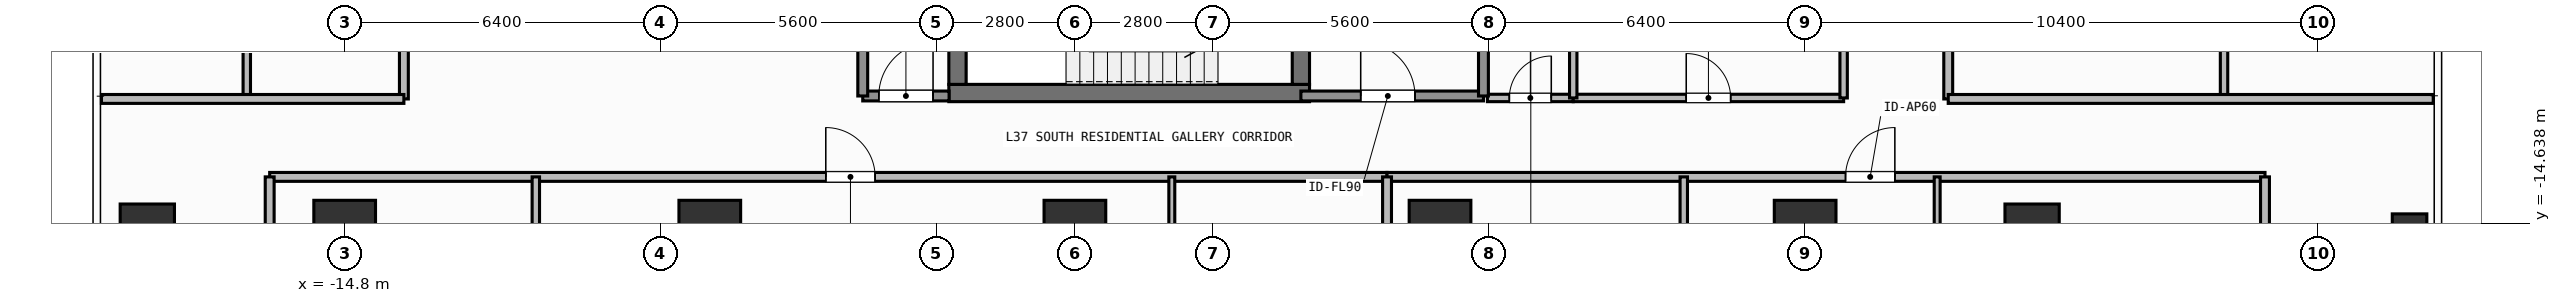
"""IFC4 building model, lengths in metres.
Left out: names, types, materials, properties, quantities, classifications, styles, units other than length and angle.
Written with IfcOpenShell. Run it as: python <this file> out.ifc"""

import sys

from ifc_helpers import new_model, si_unit, direction, frame, frame_2d, origin, origin_2d, place, context, subcontext, project, spatial, rectangle, hollow_rectangle, extrude, element, fill, save


model = new_model("IFC4")
c1 = context("Model", 3, precision=1e-05, world=origin(), true_north=direction((0.0, 1.0)))
c2 = subcontext(c1, "Body", "Model", "MODEL_VIEW")
j1 = project(units=[si_unit("LENGTHUNIT", "METRE"), si_unit("PLANEANGLEUNIT", "RADIAN")], contexts=[c1])
p1 = place(None, origin())
s1 = spatial("IfcSite", under=j1, at=p1, CompositionType="ELEMENT")
p2 = place(p1, origin())
s2 = spatial("IfcBuilding", under=s1, at=p2, CompositionType="ELEMENT")
p3 = place(p2, frame((0.0, 0.0, 148.5)))
s3 = spatial("IfcBuildingStorey", under=s2, at=p3, CompositionType="ELEMENT", Elevation=148.5)
p4 = place(p3, frame((-2.555, -12.0, 0.0), z_axis=(0.0, 0.0, 1.0), x_axis=(1.0, 0.0, 0.0)))
e1 = element("IfcWall", 1, at=p4, inside=s3, PredefinedType="SHEAR", context=c2, shape_type="SweptSolid", body=[
    extrude(rectangle(XDim=7.31, YDim=0.35, at=frame_2d((3.655, 0.0))), origin(), (0.0, 0.0, 1.0), 3.9),
])
p5 = place(p3, frame((-2.38, -11.825, 0.0), z_axis=(0.0, 0.0, 1.0), x_axis=(0.0, 1.0, 0.0)))
e2 = element("IfcWall", 2, at=p5, inside=s3, PredefinedType="SHEAR", context=c2, shape_type="SweptSolid", body=[
    extrude(rectangle(XDim=2.925, YDim=0.35, at=frame_2d((1.462, 0.0))), origin(), (0.0, 0.0, 1.0), 3.9),
])
p6 = place(p3, frame((4.58, -8.9, 0.0), z_axis=(0.0, 0.0, 1.0), x_axis=(0.0, -1.0, 0.0)))
e3 = element("IfcWall", 3, at=p6, inside=s3, PredefinedType="SHEAR", context=c2, shape_type="SweptSolid", body=[
    extrude(rectangle(XDim=2.925, YDim=0.35, at=frame_2d((1.462, 0.0))), origin(), (0.0, 0.0, 1.0), 3.9),
])
p7 = place(p6, frame((0.913, 0.0, 0.0)))
e4 = element("IfcOpeningElement", 4, at=p7, cuts=e3, PredefinedType="OPENING", context=c2, shape_type="SweptSolid", body=[
    extrude(rectangle(XDim=1.1, YDim=2.15, at=frame_2d((0.55, 1.075))), frame((0.0, 0.185, 0.0), z_axis=(0.0, -1.0, 0.0), x_axis=(1.0, 0.0, 0.0)), (0.0, 0.0, 1.0), 0.37),
])
for number, where, z_axis, x_axis in (
    (5, (-14.8, -14.8, 0.0), (0.0, 0.0, 1.0), (1.0, 0.0, 0.0)),
    (6, (-7.4, -14.8, 0.0), (0.0, 0.0, 1.0), (1.0, 0.0, 0.0)),
    (7, (0.0, -14.8, 0.0), (0.0, 0.0, 1.0), (1.0, 0.0, 0.0)),
    (8, (7.4, -14.8, 0.0), (0.0, 0.0, 1.0), (1.0, 0.0, 0.0)),
    (9, (14.8, -14.8, 0.0), (0.0, 0.0, 1.0), (1.0, 0.0, 0.0)),
):
    element("IfcColumn", number, at=place(p3, frame(where, z_axis=z_axis, x_axis=x_axis)), inside=s3, PredefinedType="COLUMN", context=c2, shape_type="SweptSolid", body=[
        extrude(rectangle(XDim=1.25, YDim=1.25, at=origin_2d()), origin(), (0.0, 0.0, 1.0), 3.9),
    ])
for number, where, z_axis, x_axis in (
    (10, (-18.8, -14.8, 0.0), (0.0, 0.0, 1.0), (1.0, 0.0, 0.0)),
    (11, (19.4, -14.8, 0.0), (0.0, 0.0, 1.0), (1.0, 0.0, 0.0)),
):
    element("IfcColumn", number, at=place(p3, frame(where, z_axis=z_axis, x_axis=x_axis)), inside=s3, PredefinedType="COLUMN", context=c2, shape_type="SweptSolid", body=[
        extrude(rectangle(XDim=1.1, YDim=1.1, at=origin_2d()), origin(), (0.0, 0.0, 1.0), 3.9),
    ])
p8 = place(p3, frame((27.05, -14.8, 0.0), z_axis=(0.0, 0.0, 1.0), x_axis=(1.0, 0.0, 0.0)))
e12 = element("IfcColumn", 12, at=p8, inside=s3, PredefinedType="COLUMN", context=c2, shape_type="SweptSolid", body=[
    extrude(hollow_rectangle(XDim=0.7, YDim=0.7, WallThickness=0.032, at=origin_2d()), origin(), (0.0, 0.0, 1.0), 3.9),
])
p9 = place(p3, frame((4.58, -12.06, 0.0), z_axis=(0.0, 0.0, 1.0), x_axis=(1.0, 0.0, 0.0)))
e13 = element("IfcWall", 13, at=p9, inside=s3, PredefinedType="SOLIDWALL", context=c2, shape_type="SweptSolid", body=[
    extrude(rectangle(XDim=3.7, YDim=0.2, at=frame_2d((1.85, 0.0))), origin(), (0.0, 0.0, 1.0), 3.68),
])
p10 = place(p9, frame((1.212, 0.0, 0.0)))
e14 = element("IfcOpeningElement", 14, at=p10, cuts=e13, PredefinedType="OPENING", context=c2, shape_type="SweptSolid", body=[
    extrude(rectangle(XDim=1.1, YDim=2.15, at=frame_2d((0.55, 1.075))), frame((0.0, 0.11, 0.0), z_axis=(0.0, -1.0, 0.0), x_axis=(1.0, 0.0, 0.0)), (0.0, 0.0, 1.0), 0.22),
])
p11 = place(p3, frame((-4.3, -12.06, 0.0), z_axis=(0.0, 0.0, 1.0), x_axis=(1.0, 0.0, 0.0)))
e15 = element("IfcWall", 15, at=p11, inside=s3, PredefinedType="SOLIDWALL", context=c2, shape_type="SweptSolid", body=[
    extrude(rectangle(XDim=1.75, YDim=0.2, at=frame_2d((0.875, 0.0))), origin(), (0.0, 0.0, 1.0), 3.68),
])
p12 = place(p11, frame((0.325, 0.0, 0.0)))
e16 = element("IfcOpeningElement", 16, at=p12, cuts=e15, PredefinedType="OPENING", context=c2, shape_type="SweptSolid", body=[
    extrude(rectangle(XDim=1.1, YDim=2.15, at=frame_2d((0.55, 1.075))), frame((0.0, 0.11, 0.0), z_axis=(0.0, -1.0, 0.0), x_axis=(1.0, 0.0, 0.0)), (0.0, 0.0, 1.0), 0.22),
])
p13 = place(p3, frame((8.36, -12.1, 0.0), z_axis=(0.0, 0.0, 1.0), x_axis=(1.0, 0.0, 0.0)))
e17 = element("IfcWall", 17, at=p13, inside=s3, PredefinedType="PARTITIONING", context=c2, shape_type="SweptSolid", body=[
    extrude(rectangle(XDim=1.74, YDim=0.15, at=frame_2d((0.87, 0.0))), origin(), (0.0, 0.0, 1.0), 3.68),
])
p14 = place(p13, frame((0.445, 0.0, 0.0)))
e18 = element("IfcOpeningElement", 18, at=p14, cuts=e17, PredefinedType="OPENING", context=c2, shape_type="SweptSolid", body=[
    extrude(rectangle(XDim=0.85, YDim=2.1, at=frame_2d((0.425, 1.05))), frame((0.0, 0.085, 0.0), z_axis=(0.0, -1.0, 0.0), x_axis=(1.0, 0.0, 0.0)), (0.0, 0.0, 1.0), 0.17),
])
p15 = place(p3, frame((10.1, -12.1, 0.0), z_axis=(0.0, 0.0, 1.0), x_axis=(1.0, 0.0, 0.0)))
e19 = element("IfcWall", 19, at=p15, inside=s3, PredefinedType="PARTITIONING", context=c2, shape_type="SweptSolid", body=[
    extrude(rectangle(XDim=5.48, YDim=0.15, at=frame_2d((2.74, 0.0))), origin(), (0.0, 0.0, 1.0), 3.68),
])
p16 = place(p15, frame((2.29, 0.0, 0.0)))
e20 = element("IfcOpeningElement", 20, at=p16, cuts=e19, PredefinedType="OPENING", context=c2, shape_type="SweptSolid", body=[
    extrude(rectangle(XDim=0.9, YDim=2.1, at=frame_2d((0.45, 1.05))), frame((0.0, 0.085, 0.0), z_axis=(0.0, -1.0, 0.0), x_axis=(1.0, 0.0, 0.0)), (0.0, 0.0, 1.0), 0.17),
])
p17 = place(p3, frame((-16.32, -13.7, 0.0), z_axis=(0.0, 0.0, 1.0), x_axis=(1.0, 0.0, 0.0)))
e21 = element("IfcWall", 21, at=p17, inside=s3, PredefinedType="PARTITIONING", context=c2, shape_type="SweptSolid", body=[
    extrude(rectangle(XDim=22.646, YDim=0.18, at=frame_2d((11.323, 0.0))), origin(), (0.0, 0.0, 1.0), 3.68),
])
p18 = place(p17, frame((11.271, 0.0, 0.0)))
e22 = element("IfcOpeningElement", 22, at=p18, cuts=e21, PredefinedType="OPENING", context=c2, shape_type="SweptSolid", body=[
    extrude(rectangle(XDim=1.0, YDim=2.2, at=frame_2d((0.5, 1.1))), frame((0.0, 0.1, 0.0), z_axis=(0.0, -1.0, 0.0), x_axis=(1.0, 0.0, 0.0)), (0.0, 0.0, 1.0), 0.2),
])
p19 = place(p3, frame((-10.926, -19.634, 0.0), z_axis=(0.0, 0.0, 1.0), x_axis=(0.0, 1.0, 0.0)))
e23 = element("IfcWall", 23, at=p19, inside=s3, PredefinedType="PARTITIONING", context=c2, shape_type="SweptSolid", body=[
    extrude(rectangle(XDim=5.934, YDim=0.15, at=frame_2d((2.967, 0.0))), origin(), (0.0, 0.0, 1.0), 3.37),
])
p20 = place(p19, frame((2.63, 0.0, 0.0)))
e24 = element("IfcOpeningElement", 24, at=p20, cuts=e23, PredefinedType="OPENING", context=c2, shape_type="SweptSolid", body=[
    extrude(rectangle(XDim=0.85, YDim=2.1, at=frame_2d((0.425, 1.05))), frame((0.0, 0.085, 0.0), z_axis=(0.0, -1.0, 0.0), x_axis=(1.0, 0.0, 0.0)), (0.0, 0.0, 1.0), 0.17),
])
p21 = place(p3, frame((1.964, -17.628, 0.0), z_axis=(0.0, 0.0, 1.0), x_axis=(0.0, 1.0, 0.0)))
e25 = element("IfcWall", 25, at=p21, inside=s3, PredefinedType="PARTITIONING", context=c2, shape_type="SweptSolid", body=[
    extrude(rectangle(XDim=3.928, YDim=0.12, at=frame_2d((1.964, 0.0))), origin(), (0.0, 0.0, 1.0), 3.68),
])
p22 = place(p21, frame((1.194, 0.0, 0.0)))
e26 = element("IfcOpeningElement", 26, at=p22, cuts=e25, PredefinedType="OPENING", context=c2, shape_type="SweptSolid", body=[
    extrude(rectangle(XDim=0.85, YDim=2.1, at=frame_2d((0.425, 1.05))), frame((0.0, 0.07, 0.0), z_axis=(0.0, -1.0, 0.0), x_axis=(1.0, 0.0, 0.0)), (0.0, 0.0, 1.0), 0.14),
])
p23 = place(p3, frame((6.326, -13.7, 0.0), z_axis=(0.0, 0.0, 1.0), x_axis=(1.0, 0.0, 0.0)))
e27 = element("IfcWall", 27, at=p23, inside=s3, PredefinedType="PARTITIONING", context=c2, shape_type="SweptSolid", body=[
    extrude(rectangle(XDim=17.794, YDim=0.18, at=frame_2d((8.897, 0.0))), origin(), (0.0, 0.0, 1.0), 3.68),
])
p24 = place(p23, frame((9.292, 0.0, 0.0)))
e28 = element("IfcOpeningElement", 28, at=p24, cuts=e27, PredefinedType="OPENING", context=c2, shape_type="SweptSolid", body=[
    extrude(rectangle(XDim=1.0, YDim=2.2, at=frame_2d((0.5, 1.1))), frame((0.0, 0.1, 0.0), z_axis=(0.0, -1.0, 0.0), x_axis=(1.0, 0.0, 0.0)), (0.0, 0.0, 1.0), 0.2),
])
p25 = place(p3, frame((12.34, -19.39, 0.0), z_axis=(0.0, 0.0, 1.0), x_axis=(0.0, 1.0, 0.0)))
e29 = element("IfcWall", 29, at=p25, inside=s3, PredefinedType="PARTITIONING", context=c2, shape_type="SweptSolid", body=[
    extrude(rectangle(XDim=5.69, YDim=0.15, at=frame_2d((2.845, 0.0))), origin(), (0.0, 0.0, 1.0), 3.68),
])
p26 = place(p25, frame((2.42, 0.0, 0.0)))
e30 = element("IfcOpeningElement", 30, at=p26, cuts=e29, PredefinedType="OPENING", context=c2, shape_type="SweptSolid", body=[
    extrude(rectangle(XDim=0.85, YDim=2.1, at=frame_2d((0.425, 1.05))), frame((0.0, 0.085, 0.0), z_axis=(0.0, -1.0, 0.0), x_axis=(1.0, 0.0, 0.0)), (0.0, 0.0, 1.0), 0.17),
])
p27 = place(p3, frame((17.476, -17.683, 0.0), z_axis=(0.0, 0.0, 1.0), x_axis=(0.0, 1.0, 0.0)))
e31 = element("IfcWall", 31, at=p27, inside=s3, PredefinedType="PARTITIONING", context=c2, shape_type="SweptSolid", body=[
    extrude(rectangle(XDim=3.983, YDim=0.12, at=frame_2d((1.992, 0.0))), origin(), (0.0, 0.0, 1.0), 3.68),
])
p28 = place(p27, frame((1.391, 0.0, 0.0)))
e32 = element("IfcOpeningElement", 32, at=p28, cuts=e31, PredefinedType="OPENING", context=c2, shape_type="SweptSolid", body=[
    extrude(rectangle(XDim=0.85, YDim=2.1, at=frame_2d((0.425, 1.05))), frame((0.0, 0.07, 0.0), z_axis=(0.0, -1.0, 0.0), x_axis=(1.0, 0.0, 0.0)), (0.0, 0.0, 1.0), 0.14),
])
p29 = place(p3, frame((-13.6, -12.12, 0.0), z_axis=(0.0, 0.0, 1.0), x_axis=(0.0, 1.0, 0.0)))
e33 = element("IfcWall", 33, at=p29, inside=s3, PredefinedType="PARTITIONING", context=c2, shape_type="SweptSolid", body=[
    extrude(rectangle(XDim=10.956, YDim=0.18, at=frame_2d((5.478, 0.0))), origin(), (0.0, 0.0, 1.0), 3.68),
])
p30 = place(p29, frame((5.513, 0.0, 0.0)))
e34 = element("IfcOpeningElement", 34, at=p30, cuts=e33, PredefinedType="OPENING", context=c2, shape_type="SweptSolid", body=[
    extrude(rectangle(XDim=1.0, YDim=2.2, at=frame_2d((0.5, 1.1))), frame((0.0, 0.1, 0.0), z_axis=(0.0, -1.0, 0.0), x_axis=(1.0, 0.0, 0.0)), (0.0, 0.0, 1.0), 0.2),
])
p31 = place(p3, frame((17.7, -12.12, 0.0), z_axis=(0.0, 0.0, 1.0), x_axis=(0.0, 1.0, 0.0)))
e35 = element("IfcWall", 35, at=p31, inside=s3, PredefinedType="PARTITIONING", context=c2, shape_type="SweptSolid", body=[
    extrude(rectangle(XDim=24.24, YDim=0.18, at=frame_2d((12.12, 0.0))), origin(), (0.0, 0.0, 1.0), 3.68),
])
p32 = place(p31, frame((11.62, 0.0, 0.0)))
e36 = element("IfcOpeningElement", 36, at=p32, cuts=e35, PredefinedType="OPENING", context=c2, shape_type="SweptSolid", body=[
    extrude(rectangle(XDim=1.0, YDim=2.2, at=frame_2d((0.5, 1.1))), frame((0.0, 0.1, 0.0), z_axis=(0.0, -1.0, 0.0), x_axis=(1.0, 0.0, 0.0)), (0.0, 0.0, 1.0), 0.2),
])
for number, where, z_axis, x_axis in (
    (37, (8.28, -12.06, 0.0), (0.0, 0.0, 1.0), (0.0, 1.0, 0.0)),
    (38, (-4.3, -12.06, 0.0), (0.0, 0.0, 1.0), (0.0, 1.0, 0.0)),
):
    element("IfcWall", number, at=place(p3, frame(where, z_axis=z_axis, x_axis=x_axis)), inside=s3, PredefinedType="SOLIDWALL", context=c2, shape_type="SweptSolid", body=[
        extrude(rectangle(XDim=3.185, YDim=0.2, at=frame_2d((1.593, 0.0))), origin(), (0.0, 0.0, 1.0), 3.68),
    ])
p33 = place(p3, frame((10.1, -12.1, 0.0), z_axis=(0.0, 0.0, 1.0), x_axis=(0.0, 1.0, 0.0)))
e39 = element("IfcWall", 39, at=p33, inside=s3, PredefinedType="PARTITIONING", context=c2, shape_type="SweptSolid", body=[
    extrude(rectangle(XDim=2.35, YDim=0.15, at=frame_2d((1.175, 0.0))), origin(), (0.0, 0.0, 1.0), 3.68),
])
p34 = place(p3, frame((15.58, -12.1, 0.0), z_axis=(0.0, 0.0, 1.0), x_axis=(0.0, 1.0, 0.0)))
e40 = element("IfcWall", 40, at=p34, inside=s3, PredefinedType="PARTITIONING", context=c2, shape_type="SweptSolid", body=[
    extrude(rectangle(XDim=6.25, YDim=0.15, at=frame_2d((3.125, 0.0))), origin(), (0.0, 0.0, 1.0), 3.68),
])
for number, where, z_axis, x_axis in (
    (41, (-16.32, -22.51, 0.0), (0.0, 0.0, 1.0), (0.0, 1.0, 0.0)),
    (42, (24.12, -22.51, 0.0), (0.0, 0.0, 1.0), (0.0, 1.0, 0.0)),
):
    element("IfcWall", number, at=place(p3, frame(where, z_axis=z_axis, x_axis=x_axis)), inside=s3, PredefinedType="PARTITIONING", context=c2, shape_type="SweptSolid", body=[
        extrude(rectangle(XDim=8.81, YDim=0.18, at=frame_2d((4.405, 0.0))), origin(), (0.0, 0.0, 1.0), 3.68),
    ])
p35 = place(p3, frame((6.326, -23.63, 0.0), z_axis=(0.0, 0.0, 1.0), x_axis=(0.0, 1.0, 0.0)))
e43 = element("IfcWall", 43, at=p35, inside=s3, PredefinedType="PARTITIONING", context=c2, shape_type="SweptSolid", body=[
    extrude(rectangle(XDim=9.93, YDim=0.18, at=frame_2d((4.965, 0.0))), origin(), (0.0, 0.0, 1.0), 3.68),
])
p36 = place(p3, frame((-16.784, -12.12, 0.0), z_axis=(0.0, 0.0, 1.0), x_axis=(0.0, 1.0, 0.0)))
e44 = element("IfcWall", 44, at=p36, inside=s3, PredefinedType="PARTITIONING", context=c2, shape_type="SweptSolid", body=[
    extrude(rectangle(XDim=3.726, YDim=0.15, at=frame_2d((1.863, 0.0))), origin(), (0.0, 0.0, 1.0), 3.68),
])
p37 = place(p3, frame((-19.73, -12.12, 0.0), z_axis=(0.0, 0.0, 1.0), x_axis=(1.0, 0.0, 0.0)))
e45 = element("IfcWall", 45, at=p37, inside=s3, PredefinedType="PARTITIONING", context=c2, shape_type="SweptSolid", body=[
    extrude(rectangle(XDim=6.13, YDim=0.18, at=frame_2d((3.065, 0.0))), origin(), (0.0, 0.0, 1.0), 3.68),
])
p38 = place(p3, frame((23.29, -12.12, 0.0), z_axis=(0.0, 0.0, 1.0), x_axis=(0.0, 1.0, 0.0)))
e46 = element("IfcWall", 46, at=p38, inside=s3, PredefinedType="PARTITIONING", context=c2, shape_type="SweptSolid", body=[
    extrude(rectangle(XDim=6.684, YDim=0.15, at=frame_2d((3.342, 0.0))), origin(), (0.0, 0.0, 1.0), 3.68),
])
p39 = place(p3, frame((17.7, -12.12, 0.0), z_axis=(0.0, 0.0, 1.0), x_axis=(1.0, 0.0, 0.0)))
e47 = element("IfcWall", 47, at=p39, inside=s3, PredefinedType="PARTITIONING", context=c2, shape_type="SweptSolid", body=[
    extrude(rectangle(XDim=9.83, YDim=0.18, at=frame_2d((4.915, 0.0))), origin(), (0.0, 0.0, 1.0), 3.68),
])
p40 = place(p10, origin())
e48 = element("IfcDoor", 48, at=p40, inside=s3, OperationType="SINGLE_SWING_LEFT", PredefinedType="DOOR", context=c2, shape_type="SweptSolid", body=[
    extrude(rectangle(XDim=1.1, YDim=2.15, at=frame_2d((0.55, 1.075))), frame((0.0, 0.025, 0.0), z_axis=(0.0, -1.0, 0.0), x_axis=(1.0, 0.0, 0.0)), (0.0, 0.0, 1.0), 0.05),
])
fill(e14, e48)
p41 = place(p12, origin())
e49 = element("IfcDoor", 49, at=p41, inside=s3, OperationType="SINGLE_SWING_RIGHT", PredefinedType="DOOR", context=c2, shape_type="SweptSolid", body=[
    extrude(rectangle(XDim=1.1, YDim=2.15, at=frame_2d((0.55, 1.075))), frame((0.0, 0.025, 0.0), z_axis=(0.0, -1.0, 0.0), x_axis=(1.0, 0.0, 0.0)), (0.0, 0.0, 1.0), 0.05),
])
fill(e16, e49)
p42 = place(p14, origin())
e50 = element("IfcDoor", 50, at=p42, inside=s3, OperationType="SINGLE_SWING_RIGHT", PredefinedType="DOOR", context=c2, shape_type="SweptSolid", body=[
    extrude(rectangle(XDim=0.85, YDim=2.1, at=frame_2d((0.425, 1.05))), frame((0.0, 0.025, 0.0), z_axis=(0.0, -1.0, 0.0), x_axis=(1.0, 0.0, 0.0)), (0.0, 0.0, 1.0), 0.05),
])
fill(e18, e50)
p43 = place(p16, origin())
e51 = element("IfcDoor", 51, at=p43, inside=s3, OperationType="SINGLE_SWING_LEFT", PredefinedType="DOOR", context=c2, shape_type="SweptSolid", body=[
    extrude(rectangle(XDim=0.9, YDim=2.1, at=frame_2d((0.45, 1.05))), frame((0.0, 0.025, 0.0), z_axis=(0.0, -1.0, 0.0), x_axis=(1.0, 0.0, 0.0)), (0.0, 0.0, 1.0), 0.05),
])
fill(e20, e51)
p44 = place(p18, origin())
e52 = element("IfcDoor", 52, at=p44, inside=s3, OperationType="SINGLE_SWING_LEFT", PredefinedType="DOOR", context=c2, shape_type="SweptSolid", body=[
    extrude(rectangle(XDim=1.0, YDim=2.2, at=frame_2d((0.5, 1.1))), frame((0.0, 0.025, 0.0), z_axis=(0.0, -1.0, 0.0), x_axis=(1.0, 0.0, 0.0)), (0.0, 0.0, 1.0), 0.05),
])
fill(e22, e52)
p45 = place(p24, origin())
e53 = element("IfcDoor", 53, at=p45, inside=s3, OperationType="SINGLE_SWING_RIGHT", PredefinedType="DOOR", context=c2, shape_type="SweptSolid", body=[
    extrude(rectangle(XDim=1.0, YDim=2.2, at=frame_2d((0.5, 1.1))), frame((0.0, 0.025, 0.0), z_axis=(0.0, -1.0, 0.0), x_axis=(1.0, 0.0, 0.0)), (0.0, 0.0, 1.0), 0.05),
])
fill(e28, e53)
save(model, sys.argv[1])
